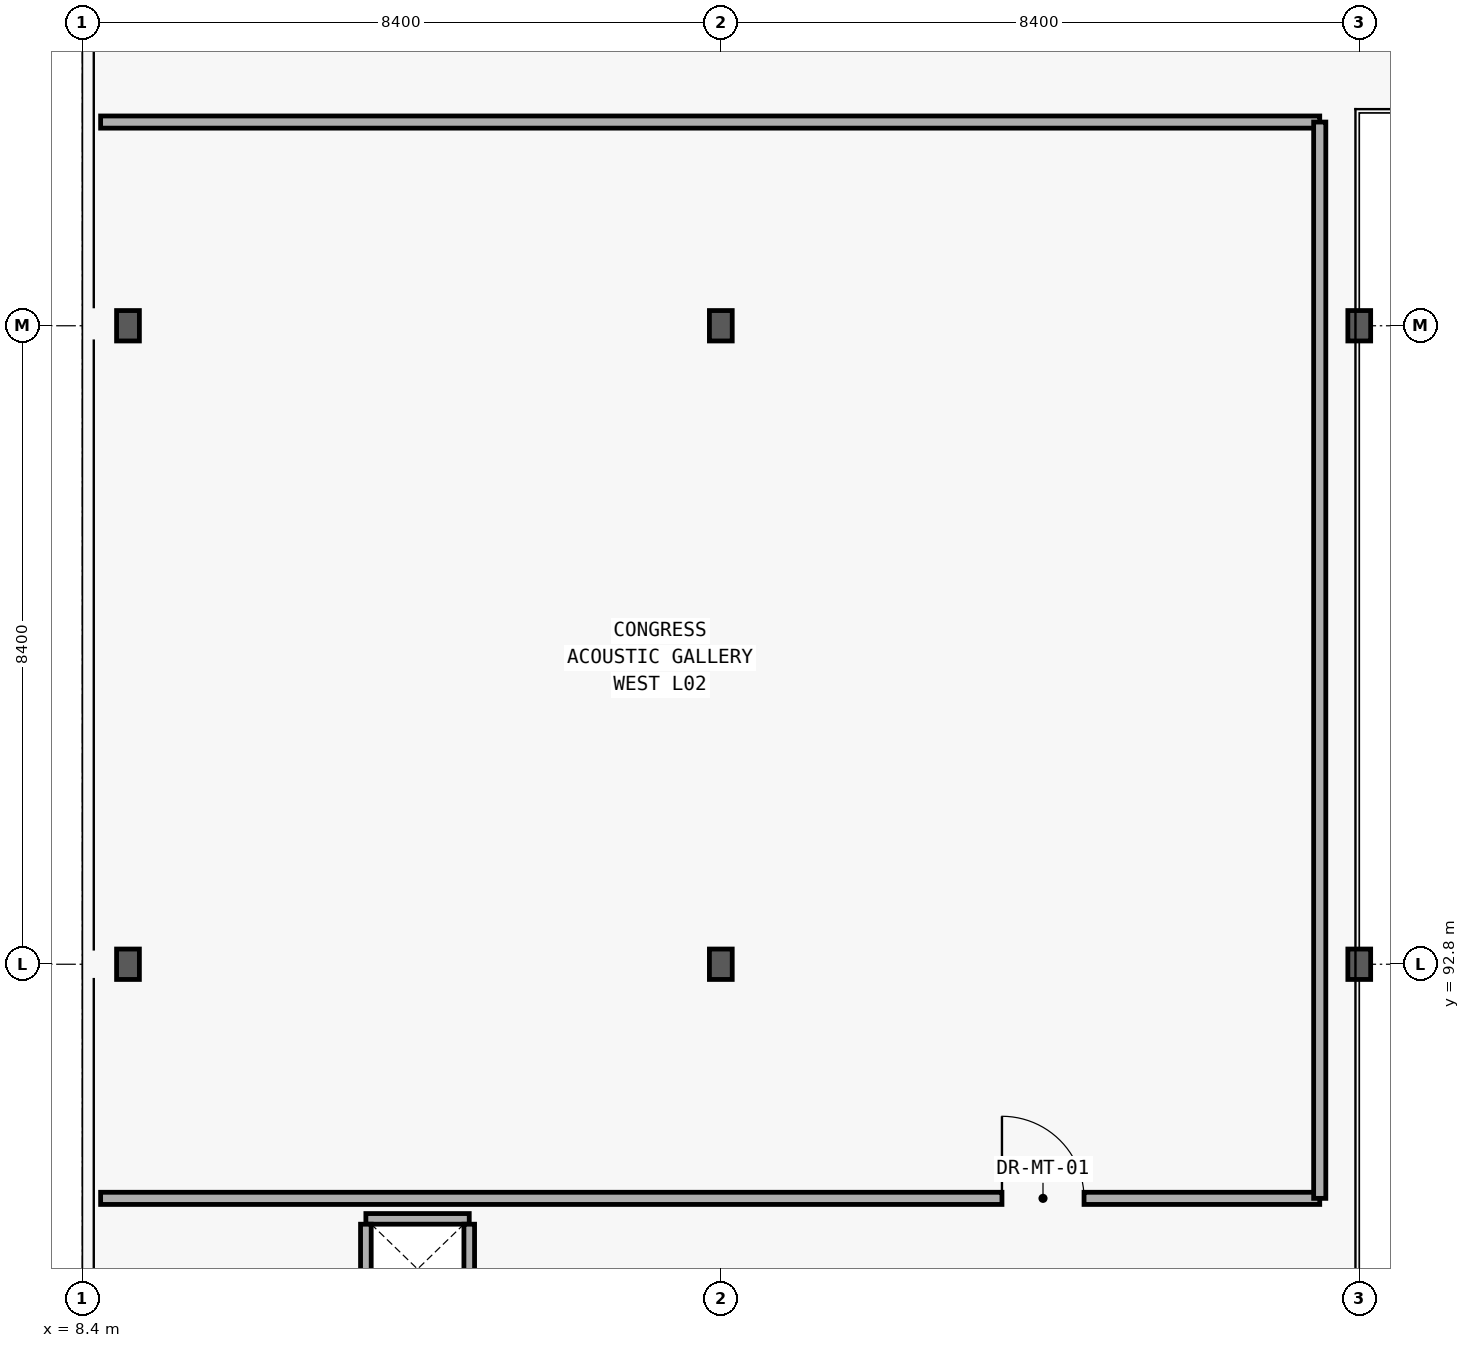
"""IFC4 building model, lengths in metres.
Left out: names, types, materials, properties, quantities, classifications, styles, units other than length and angle.
Written with IfcOpenShell. Run it as: python <this file> out.ifc"""

import sys

from ifc_helpers import new_model, si_unit, direction, frame, frame_2d, origin, origin_2d, place, context, subcontext, project, spatial, rectangle, i_section, extrude, element, fill, save


model = new_model("IFC4")
c1 = context("Model", 3, precision=1e-05, world=origin(), true_north=direction((0.0, 1.0)))
c2 = subcontext(c1, "Body", "Model", "MODEL_VIEW")
j1 = project(units=[si_unit("LENGTHUNIT", "METRE"), si_unit("PLANEANGLEUNIT", "RADIAN")], contexts=[c1])
p1 = place(None, origin())
s1 = spatial("IfcSite", under=j1, at=p1, CompositionType="ELEMENT")
p2 = place(p1, origin())
s2 = spatial("IfcBuilding", under=s1, at=p2, CompositionType="ELEMENT")
p3 = place(p2, frame((0.0, 0.0, 10.8)))
s3 = spatial("IfcBuildingStorey", under=s2, at=p3, CompositionType="ELEMENT", Elevation=10.8)
for number, where, z_axis, x_axis in (
    (1, (9.0, 92.8, 0.0), (0.0, 0.0, 1.0), (1.0, 0.0, 0.0)),
    (2, (9.0, 101.2, 0.0), (0.0, 0.0, 1.0), (1.0, 0.0, 0.0)),
    (3, (16.8, 92.8, 0.0), (0.0, 0.0, 1.0), (1.0, 0.0, 0.0)),
    (4, (16.8, 101.2, 0.0), (0.0, 0.0, 1.0), (1.0, 0.0, 0.0)),
    (5, (25.2, 92.8, 0.0), (0.0, 0.0, 1.0), (1.0, 0.0, 0.0)),
    (6, (25.2, 101.2, 0.0), (0.0, 0.0, 1.0), (1.0, 0.0, 0.0)),
):
    element("IfcColumn", number, at=place(p3, frame(where, z_axis=z_axis, x_axis=x_axis)), inside=s3, PredefinedType="COLUMN", context=c2, shape_type="SweptSolid", body=[
        extrude(i_section(OverallWidth=0.3, OverallDepth=0.4, WebThickness=0.013, FlangeThickness=0.024, at=origin_2d()), origin(), (0.0, 0.0, 1.0), 4.2),
    ])
p4 = place(p3, frame((8.64, 89.72, 0.0), z_axis=(0.0, 0.0, 1.0), x_axis=(1.0, 0.0, 0.0)))
e7 = element("IfcWall", 7, at=p4, inside=s3, PredefinedType="PARTITIONING", context=c2, shape_type="SweptSolid", body=[
    extrude(rectangle(XDim=16.04, YDim=0.16, at=frame_2d((8.02, 0.0))), origin(), (0.0, 0.0, 1.0), 3.02),
])
p5 = place(p4, frame((11.859, 0.0, 0.0)))
e8 = element("IfcOpeningElement", 8, at=p5, cuts=e7, PredefinedType="OPENING", context=c2, shape_type="SweptSolid", body=[
    extrude(rectangle(XDim=1.08, YDim=2.25, at=frame_2d((0.54, 1.125))), frame((0.0, 0.09, 0.0), z_axis=(0.0, -1.0, 0.0), x_axis=(1.0, 0.0, 0.0)), (0.0, 0.0, 1.0), 0.18),
])
p6 = place(p3, frame((8.64, 103.88, 0.0), z_axis=(0.0, 0.0, 1.0), x_axis=(1.0, 0.0, 0.0)))
e9 = element("IfcWall", 9, at=p6, inside=s3, PredefinedType="PARTITIONING", context=c2, shape_type="SweptSolid", body=[
    extrude(rectangle(XDim=16.04, YDim=0.16, at=frame_2d((8.02, 0.0))), origin(), (0.0, 0.0, 1.0), 3.02),
])
p7 = place(p3, frame((24.68, 89.72, 0.0), z_axis=(0.0, 0.0, 1.0), x_axis=(0.0, 1.0, 0.0)))
e10 = element("IfcWall", 10, at=p7, inside=s3, PredefinedType="PARTITIONING", context=c2, shape_type="SweptSolid", body=[
    extrude(rectangle(XDim=14.16, YDim=0.16, at=frame_2d((7.08, 0.0))), origin(), (0.0, 0.0, 1.0), 3.02),
])
p8 = place(p3, frame((13.49, 89.45, 0.0), z_axis=(0.0, 0.0, 1.0), x_axis=(-1.0, 0.0, 0.0)))
e11 = element("IfcWall", 11, at=p8, inside=s3, PredefinedType="PARTITIONING", context=c2, shape_type="SweptSolid", body=[
    extrude(rectangle(XDim=1.36, YDim=0.14, at=frame_2d((0.68, 0.0))), origin(), (0.0, 0.0, 1.0), 3.04),
])
for number, where, z_axis, x_axis in (
    (12, (12.13, 89.38, 0.0), (0.0, 0.0, 1.0), (0.0, -1.0, 0.0)),
    (13, (13.49, 88.2, 0.0), (0.0, 0.0, 1.0), (0.0, 1.0, 0.0)),
):
    element("IfcWall", number, at=place(p3, frame(where, z_axis=z_axis, x_axis=x_axis)), inside=s3, PredefinedType="PARTITIONING", context=c2, shape_type="SweptSolid", body=[
        extrude(rectangle(XDim=1.18, YDim=0.14, at=frame_2d((0.59, 0.0))), origin(), (0.0, 0.0, 1.0), 3.04),
    ])
p9 = place(p5, origin())
e14 = element("IfcDoor", 14, at=p9, inside=s3, OperationType="SINGLE_SWING_LEFT", PredefinedType="DOOR", context=c2, shape_type="SweptSolid", body=[
    extrude(rectangle(XDim=1.08, YDim=2.25, at=frame_2d((0.54, 1.125))), frame((0.0, 0.025, 0.0), z_axis=(0.0, -1.0, 0.0), x_axis=(1.0, 0.0, 0.0)), (0.0, 0.0, 1.0), 0.05),
])
fill(e8, e14)
save(model, sys.argv[1])
